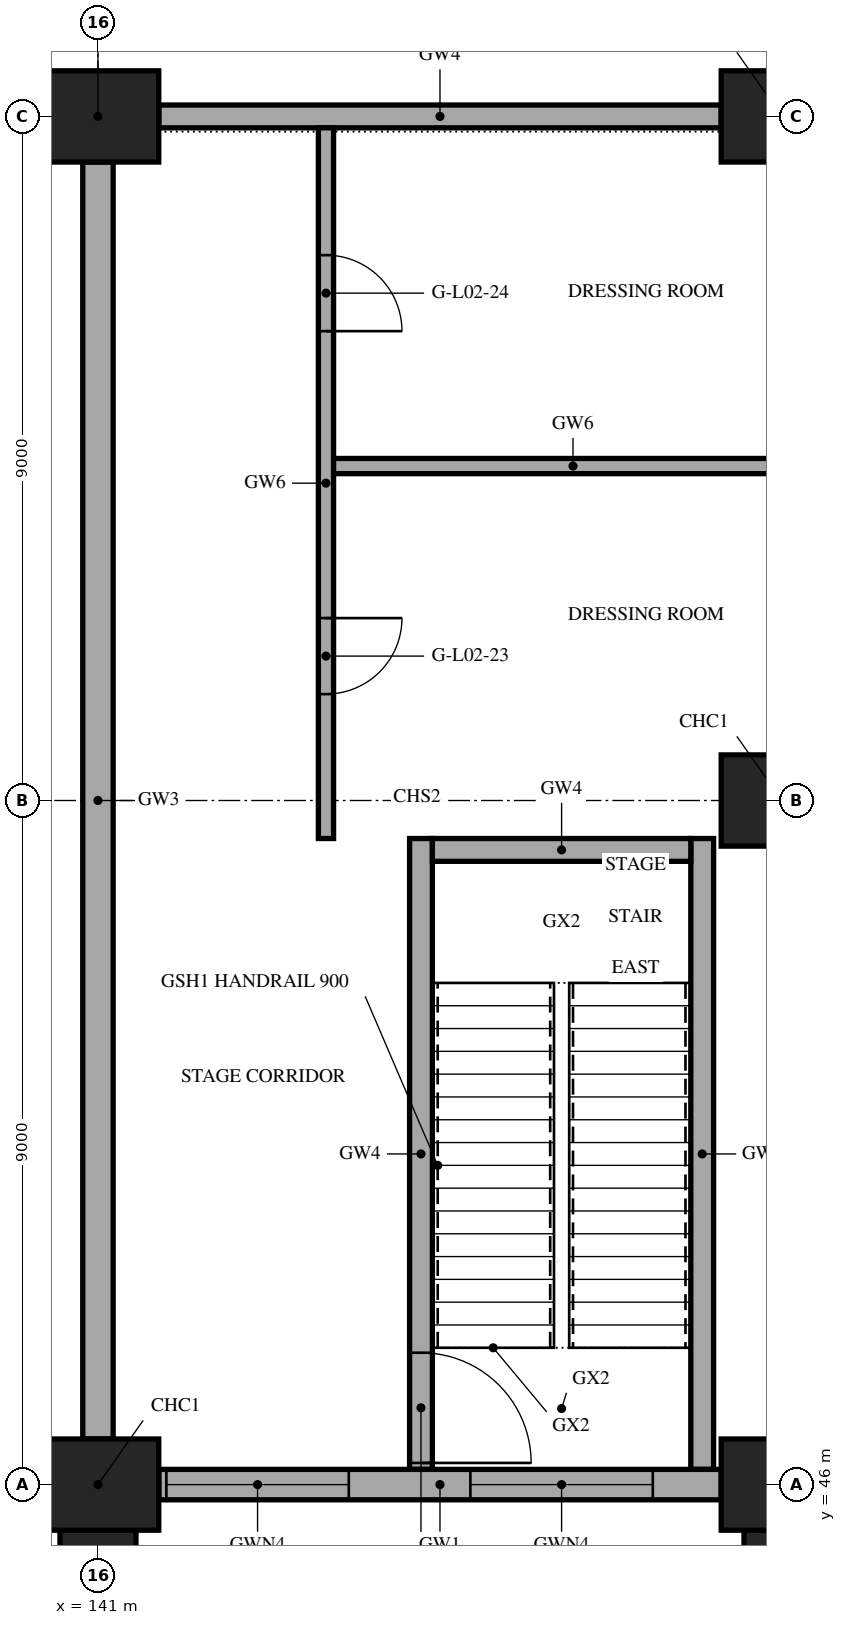
"""IFC4 building model, lengths in metres.
Left out: names, types, materials, properties, quantities, classifications, styles, units other than length and angle.
Written with IfcOpenShell. Run it as: python <this file> out.ifc"""

import sys

from ifc_helpers import new_model, si_unit, direction, frame, frame_2d, origin, origin_2d, place, context, subcontext, project, spatial, rectangle, extrude, element, fill, save


model = new_model("IFC4")
c1 = context("Model", 3, precision=1e-05, world=origin(), true_north=direction((0.0, 1.0)))
c2 = subcontext(c1, "Body", "Model", "MODEL_VIEW")
j1 = project(units=[si_unit("LENGTHUNIT", "METRE"), si_unit("PLANEANGLEUNIT", "RADIAN")], contexts=[c1])
p1 = place(None, origin())
s1 = spatial("IfcSite", under=j1, at=p1, CompositionType="ELEMENT")
p2 = place(p1, origin())
s2 = spatial("IfcBuilding", under=s1, at=p2, CompositionType="ELEMENT")
p3 = place(p2, frame((0.0, 0.0, 10.0)))
s3 = spatial("IfcBuildingStorey", under=s2, at=p3, CompositionType="ELEMENT", Elevation=10.0)
for number, where, z_axis, x_axis in (
    (1, (141.0, 44.9, 0.0), (0.0, 0.0, 1.0), (1.0, 0.0, 0.0)),
    (2, (150.0, 44.9, 0.0), (0.0, 0.0, 1.0), (1.0, 0.0, 0.0)),
):
    element("IfcColumn", number, at=place(p3, frame(where, z_axis=z_axis, x_axis=x_axis)), inside=s3, PredefinedType="COLUMN", context=c2, shape_type="SweptSolid", body=[
        extrude(rectangle(XDim=1.0, YDim=1.0, at=origin_2d()), origin(), (0.0, 0.0, 1.0), 3.4),
    ])
for number, where, z_axis, x_axis in (
    (3, (141.0, 46.0, 0.0), (0.0, 0.0, 1.0), (1.0, 0.0, 0.0)),
    (4, (150.0, 46.0, 0.0), (0.0, 0.0, 1.0), (1.0, 0.0, 0.0)),
    (5, (150.0, 55.0, 0.0), (0.0, 0.0, 1.0), (1.0, 0.0, 0.0)),
    (6, (141.0, 64.0, 0.0), (0.0, 0.0, 1.0), (1.0, 0.0, 0.0)),
    (7, (150.0, 64.0, 0.0), (0.0, 0.0, 1.0), (1.0, 0.0, 0.0)),
):
    element("IfcColumn", number, at=place(p3, frame(where, z_axis=z_axis, x_axis=x_axis)), inside=s3, PredefinedType="COLUMN", context=c2, shape_type="SweptSolid", body=[
        extrude(rectangle(XDim=1.6, YDim=1.2, at=origin_2d()), origin(), (0.0, 0.0, 1.0), 5.0),
    ])
p4 = place(p3, frame((141.0, 46.6, 0.0), z_axis=(0.0, 0.0, 1.0), x_axis=(0.0, 1.0, 0.0)))
e8 = element("IfcWall", 8, at=p4, inside=s3, PredefinedType="SHEAR", context=c2, shape_type="SweptSolid", body=[
    extrude(rectangle(XDim=16.8, YDim=0.4, at=frame_2d((8.4, 0.0))), origin(), (0.0, 0.0, 1.0), 5.0),
])
p5 = place(p3, frame((141.8, 64.0, 0.0), z_axis=(0.0, 0.0, 1.0), x_axis=(1.0, 0.0, 0.0)))
e9 = element("IfcWall", 9, at=p5, inside=s3, PredefinedType="SHEAR", context=c2, shape_type="SweptSolid", body=[
    extrude(rectangle(XDim=7.4, YDim=0.3, at=frame_2d((3.7, 0.0))), origin(), (0.0, 0.0, 1.0), 5.0),
])
p6 = place(p3, frame((145.25, 46.2, 0.0), z_axis=(0.0, 0.0, 1.0), x_axis=(0.0, 1.0, 0.0)))
e10 = element("IfcWall", 10, at=p6, inside=s3, PredefinedType="SHEAR", context=c2, shape_type="SweptSolid", body=[
    extrude(rectangle(XDim=8.3, YDim=0.3, at=frame_2d((4.15, 0.0))), origin(), (0.0, 0.0, 1.0), 5.0),
])
p7 = place(p6, frame((0.085, 0.0, 0.0)))
e11 = element("IfcOpeningElement", 11, at=p7, cuts=e10, PredefinedType="OPENING", context=c2, shape_type="SweptSolid", body=[
    extrude(rectangle(XDim=1.45, YDim=2.1, at=frame_2d((0.725, 1.05))), frame((0.0, 0.16, 0.0), z_axis=(0.0, -1.0, 0.0), x_axis=(1.0, 0.0, 0.0)), (0.0, 0.0, 1.0), 0.32),
])
p8 = place(p3, frame((148.95, 46.2, 0.0), z_axis=(0.0, 0.0, 1.0), x_axis=(0.0, 1.0, 0.0)))
e12 = element("IfcWall", 12, at=p8, inside=s3, PredefinedType="SHEAR", context=c2, shape_type="SweptSolid", body=[
    extrude(rectangle(XDim=8.3, YDim=0.3, at=frame_2d((4.15, 0.0))), origin(), (0.0, 0.0, 1.0), 5.0),
])
p9 = place(p3, frame((145.4, 54.35, 0.0), z_axis=(0.0, 0.0, 1.0), x_axis=(1.0, 0.0, 0.0)))
e13 = element("IfcWall", 13, at=p9, inside=s3, PredefinedType="SHEAR", context=c2, shape_type="SweptSolid", body=[
    extrude(rectangle(XDim=3.4, YDim=0.3, at=frame_2d((1.7, 0.0))), origin(), (0.0, 0.0, 1.0), 5.0),
])
p10 = place(p3, frame((141.8, 46.0, 0.0), z_axis=(0.0, 0.0, 1.0), x_axis=(1.0, 0.0, 0.0)))
e14 = element("IfcWall", 14, at=p10, inside=s3, PredefinedType="SOLIDWALL", context=c2, shape_type="SweptSolid", body=[
    extrude(rectangle(XDim=7.4, YDim=0.4, at=frame_2d((3.7, 0.0))), origin(), (0.0, 0.0, 1.0), 5.0),
])
p11 = place(p10, frame((4.1, 0.0, 1.2)))
e15 = element("IfcOpeningElement", 15, at=p11, cuts=e14, PredefinedType="OPENING", context=c2, shape_type="SweptSolid", body=[
    extrude(rectangle(XDim=2.4, YDim=1.8, at=frame_2d((1.2, 0.9))), frame((0.0, 0.21, 0.0), z_axis=(0.0, -1.0, 0.0), x_axis=(1.0, 0.0, 0.0)), (0.0, 0.0, 1.0), 0.42),
])
p12 = place(p10, frame((0.1, 0.0, 1.2)))
e16 = element("IfcOpeningElement", 16, at=p12, cuts=e14, PredefinedType="OPENING", context=c2, shape_type="SweptSolid", body=[
    extrude(rectangle(XDim=2.4, YDim=1.8, at=frame_2d((1.2, 0.9))), frame((0.0, 0.21, 0.0), z_axis=(0.0, -1.0, 0.0), x_axis=(1.0, 0.0, 0.0)), (0.0, 0.0, 1.0), 0.42),
])
p13 = place(p3, frame((144.0, 54.5, 0.0), z_axis=(0.0, 0.0, 1.0), x_axis=(0.0, 1.0, 0.0)))
e17 = element("IfcWall", 17, at=p13, inside=s3, PredefinedType="PARTITIONING", context=c2, shape_type="SweptSolid", body=[
    extrude(rectangle(XDim=9.35, YDim=0.2, at=frame_2d((4.675, 0.0))), origin(), (0.0, 0.0, 1.0), 4.7),
])
p14 = place(p13, frame((1.9, 0.0, 0.0)))
e18 = element("IfcOpeningElement", 18, at=p14, cuts=e17, PredefinedType="OPENING", context=c2, shape_type="SweptSolid", body=[
    extrude(rectangle(XDim=1.0, YDim=2.1, at=frame_2d((0.5, 1.05))), frame((0.0, 0.11, 0.0), z_axis=(0.0, -1.0, 0.0), x_axis=(1.0, 0.0, 0.0)), (0.0, 0.0, 1.0), 0.22),
])
p15 = place(p13, frame((6.675, 0.0, 0.0)))
e19 = element("IfcOpeningElement", 19, at=p15, cuts=e17, PredefinedType="OPENING", context=c2, shape_type="SweptSolid", body=[
    extrude(rectangle(XDim=1.0, YDim=2.1, at=frame_2d((0.5, 1.05))), frame((0.0, 0.11, 0.0), z_axis=(0.0, -1.0, 0.0), x_axis=(1.0, 0.0, 0.0)), (0.0, 0.0, 1.0), 0.22),
])
p16 = place(p3, frame((144.1, 59.4, 0.0), z_axis=(0.0, 0.0, 1.0), x_axis=(1.0, 0.0, 0.0)))
e20 = element("IfcWall", 20, at=p16, inside=s3, PredefinedType="PARTITIONING", context=c2, shape_type="SweptSolid", body=[
    extrude(rectangle(XDim=6.3, YDim=0.2, at=frame_2d((3.15, 0.0))), origin(), (0.0, 0.0, 1.0), 4.7),
])
p17 = place(p11, origin())
e21 = element("IfcWindow", 21, at=p17, inside=s3, PartitioningType="SINGLE_PANEL", PredefinedType="WINDOW", context=c2, shape_type="SweptSolid", body=[
    extrude(rectangle(XDim=2.4, YDim=1.8, at=frame_2d((1.2, 0.9))), frame((0.0, 0.03, 0.0), z_axis=(0.0, -1.0, 0.0), x_axis=(1.0, 0.0, 0.0)), (0.0, 0.0, 1.0), 0.06),
])
fill(e15, e21)
p18 = place(p12, origin())
e22 = element("IfcWindow", 22, at=p18, inside=s3, PartitioningType="SINGLE_PANEL", PredefinedType="WINDOW", context=c2, shape_type="SweptSolid", body=[
    extrude(rectangle(XDim=2.4, YDim=1.8, at=frame_2d((1.2, 0.9))), frame((0.0, 0.03, 0.0), z_axis=(0.0, -1.0, 0.0), x_axis=(1.0, 0.0, 0.0)), (0.0, 0.0, 1.0), 0.06),
])
fill(e16, e22)
p19 = place(p7, frame((1.45, 0.0, 0.0), z_axis=(0.0, 0.0, 1.0), x_axis=(-1.0, 0.0, 0.0)))
e23 = element("IfcDoor", 23, at=p19, inside=s3, OperationType="SINGLE_SWING_RIGHT", PredefinedType="DOOR", context=c2, shape_type="SweptSolid", body=[
    extrude(rectangle(XDim=1.45, YDim=2.1, at=frame_2d((0.725, 1.05))), frame((0.0, 0.025, 0.0), z_axis=(0.0, -1.0, 0.0), x_axis=(1.0, 0.0, 0.0)), (0.0, 0.0, 1.0), 0.05),
])
fill(e11, e23)
p20 = place(p14, frame((1.0, 0.0, 0.0), z_axis=(0.0, 0.0, 1.0), x_axis=(-1.0, 0.0, 0.0)))
e24 = element("IfcDoor", 24, at=p20, inside=s3, OperationType="SINGLE_SWING_LEFT", PredefinedType="DOOR", context=c2, shape_type="SweptSolid", body=[
    extrude(rectangle(XDim=1.0, YDim=2.1, at=frame_2d((0.5, 1.05))), frame((0.0, 0.025, 0.0), z_axis=(0.0, -1.0, 0.0), x_axis=(1.0, 0.0, 0.0)), (0.0, 0.0, 1.0), 0.05),
])
fill(e18, e24)
p21 = place(p15, frame((1.0, 0.0, 0.0), z_axis=(0.0, 0.0, 1.0), x_axis=(-1.0, 0.0, 0.0)))
e25 = element("IfcDoor", 25, at=p21, inside=s3, OperationType="SINGLE_SWING_RIGHT", PredefinedType="DOOR", context=c2, shape_type="SweptSolid", body=[
    extrude(rectangle(XDim=1.0, YDim=2.1, at=frame_2d((0.5, 1.05))), frame((0.0, 0.025, 0.0), z_axis=(0.0, -1.0, 0.0), x_axis=(1.0, 0.0, 0.0)), (0.0, 0.0, 1.0), 0.05),
])
fill(e19, e25)
save(model, sys.argv[1])
